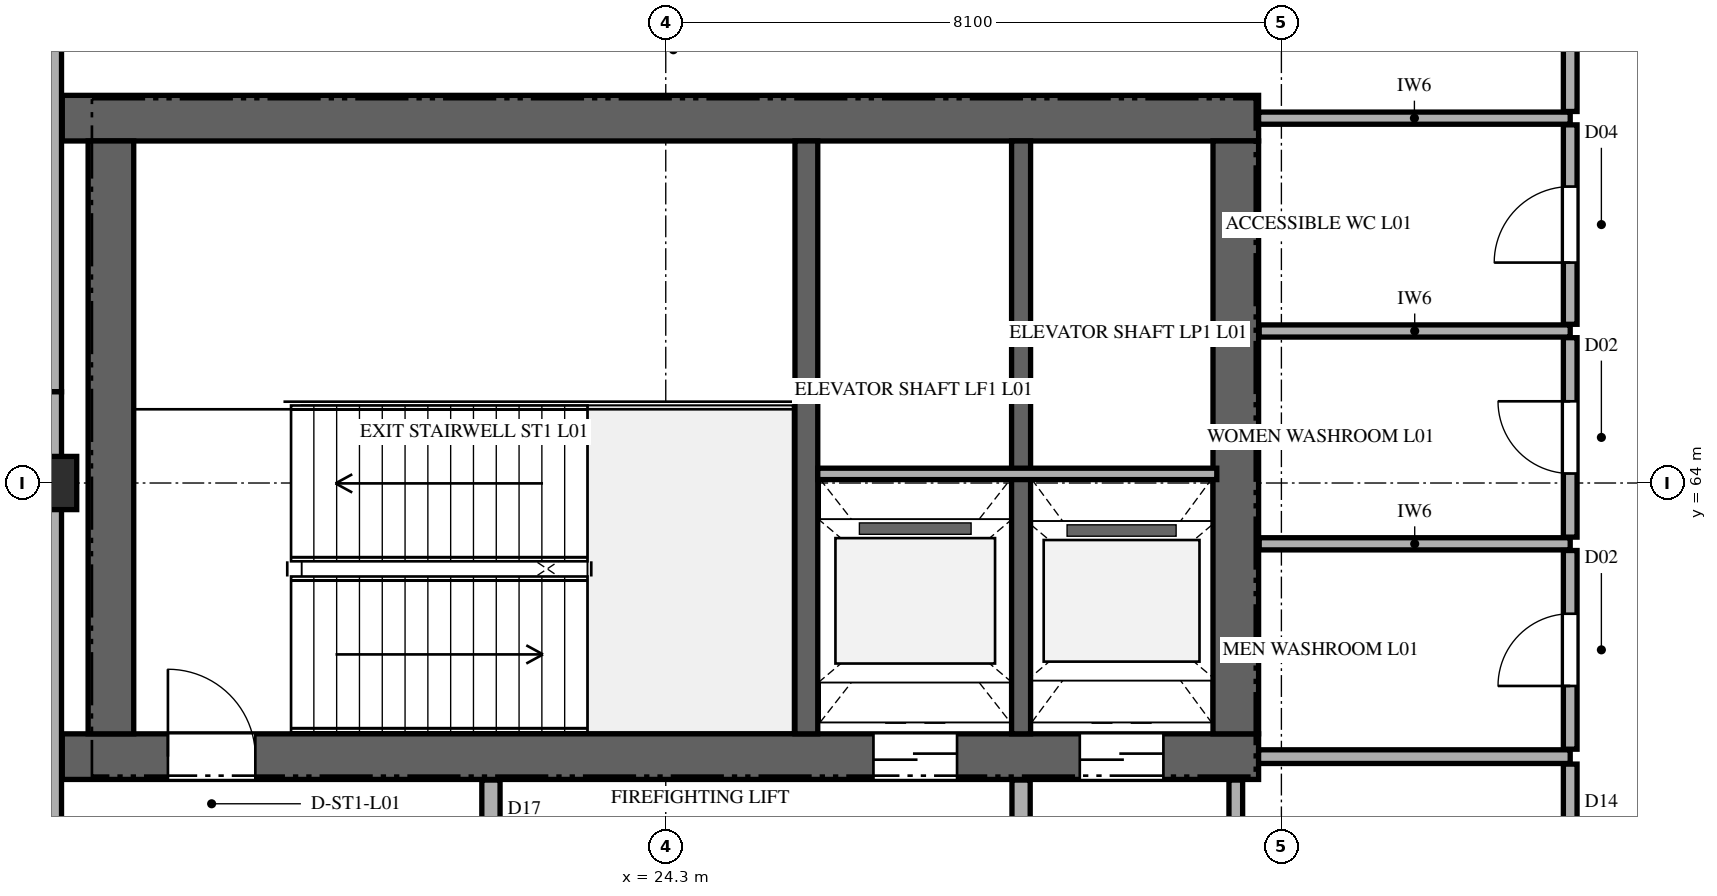
"""IFC4 building model, lengths in metres.
Left out: names, types, materials, properties, quantities, classifications, styles, units other than length and angle.
Written with IfcOpenShell. Run it as: python <this file> out.ifc"""

import sys

from ifc_helpers import new_model, si_unit, direction, frame, frame_2d, origin, origin_2d, place, context, subcontext, project, spatial, rectangle, extrude, element, fill, save


model = new_model("IFC4")
c1 = context("Model", 3, precision=1e-05, world=origin(), true_north=direction((0.0, 1.0)))
c2 = subcontext(c1, "Body", "Model", "MODEL_VIEW")
j1 = project(units=[si_unit("LENGTHUNIT", "METRE"), si_unit("PLANEANGLEUNIT", "RADIAN")], contexts=[c1])
p1 = place(None, origin())
s1 = spatial("IfcSite", under=j1, at=p1, CompositionType="ELEMENT")
p2 = place(p1, origin())
s2 = spatial("IfcBuilding", under=s1, at=p2, CompositionType="ELEMENT")
p3 = place(p2, frame((0.0, 0.0, 5.4)))
s3 = spatial("IfcBuildingStorey", under=s2, at=p3, CompositionType="ELEMENT", Elevation=5.4)
p4 = place(p3, frame((16.36, 60.4, 0.0), z_axis=(0.0, 0.0, 1.0), x_axis=(1.0, 0.0, 0.0)))
e1 = element("IfcWall", 1, at=p4, inside=s3, PredefinedType="SHEAR", context=c2, shape_type="SweptSolid", body=[
    extrude(rectangle(XDim=15.74, YDim=0.6, at=frame_2d((7.87, 0.0))), origin(), (0.0, 0.0, 1.0), 4.8),
])
p5 = place(p4, frame((1.39, 0.0, 0.0)))
e2 = element("IfcOpeningElement", 2, at=p5, cuts=e1, PredefinedType="OPENING", context=c2, shape_type="SweptSolid", body=[
    extrude(rectangle(XDim=1.15, YDim=2.25, at=frame_2d((0.575, 1.125))), frame((0.0, 0.31, 0.0), z_axis=(0.0, -1.0, 0.0), x_axis=(1.0, 0.0, 0.0)), (0.0, 0.0, 1.0), 0.62),
])
p6 = place(p4, frame((10.673, 0.0, 0.0)))
e3 = element("IfcOpeningElement", 3, at=p6, cuts=e1, PredefinedType="OPENING", context=c2, shape_type="SweptSolid", body=[
    extrude(rectangle(XDim=1.1, YDim=2.2, at=frame_2d((0.55, 1.1))), frame((0.0, 0.31, 0.0), z_axis=(0.0, -1.0, 0.0), x_axis=(1.0, 0.0, 0.0)), (0.0, 0.0, 1.0), 0.62),
])
p7 = place(p4, frame((13.387, 0.0, 0.0)))
e4 = element("IfcOpeningElement", 4, at=p7, cuts=e1, PredefinedType="OPENING", context=c2, shape_type="SweptSolid", body=[
    extrude(rectangle(XDim=1.1, YDim=2.2, at=frame_2d((0.55, 1.1))), frame((0.0, 0.31, 0.0), z_axis=(0.0, -1.0, 0.0), x_axis=(1.0, 0.0, 0.0)), (0.0, 0.0, 1.0), 0.62),
])
p8 = place(p3, frame((16.36, 68.8, 0.0), z_axis=(0.0, 0.0, 1.0), x_axis=(1.0, 0.0, 0.0)))
e5 = element("IfcWall", 5, at=p8, inside=s3, PredefinedType="SHEAR", context=c2, shape_type="SweptSolid", body=[
    extrude(rectangle(XDim=15.74, YDim=0.6, at=frame_2d((7.87, 0.0))), origin(), (0.0, 0.0, 1.0), 4.8),
])
for number, where, z_axis, x_axis in (
    (6, (17.0, 60.7, 0.0), (0.0, 0.0, 1.0), (0.0, 1.0, 0.0)),
    (7, (31.8, 60.7, 0.0), (0.0, 0.0, 1.0), (0.0, 1.0, 0.0)),
):
    element("IfcWall", number, at=place(p3, frame(where, z_axis=z_axis, x_axis=x_axis)), inside=s3, PredefinedType="SHEAR", context=c2, shape_type="SweptSolid", body=[
        extrude(rectangle(XDim=7.8, YDim=0.6, at=frame_2d((3.9, 0.0))), origin(), (0.0, 0.0, 1.0), 4.8),
    ])
p9 = place(p3, frame((26.15, 60.7, 0.0), z_axis=(0.0, 0.0, 1.0), x_axis=(0.0, 1.0, 0.0)))
e8 = element("IfcWall", 8, at=p9, inside=s3, PredefinedType="SHEAR", context=c2, shape_type="SweptSolid", body=[
    extrude(rectangle(XDim=7.8, YDim=0.3, at=frame_2d((3.9, 0.0))), origin(), (0.0, 0.0, 1.0), 4.8),
])
p10 = place(p3, frame((28.975, 60.7, 0.0), z_axis=(0.0, 0.0, 1.0), x_axis=(0.0, 1.0, 0.0)))
e9 = element("IfcWall", 9, at=p10, inside=s3, PredefinedType="SHEAR", context=c2, shape_type="SweptSolid", body=[
    extrude(rectangle(XDim=7.8, YDim=0.25, at=frame_2d((3.9, 0.0))), origin(), (0.0, 0.0, 1.0), 4.8),
])
p11 = place(p3, frame((16.2, 64.0, 0.0), z_axis=(0.0, 0.0, 1.0), x_axis=(1.0, 0.0, 0.0)))
e10 = element("IfcColumn", 10, at=p11, inside=s3, PredefinedType="COLUMN", context=c2, shape_type="SweptSolid", body=[
    extrude(rectangle(XDim=0.7, YDim=0.7, at=origin_2d()), origin(), (0.0, 0.0, 1.0), 4.8),
])
p12 = place(p3, frame((16.2, 80.8, 0.0), z_axis=(0.0, 0.0, 1.0), x_axis=(0.0, -1.0, 0.0)))
e11 = element("IfcWall", 11, at=p12, inside=s3, PredefinedType="SOLIDWALL", context=c2, shape_type="SweptSolid", body=[
    extrude(rectangle(XDim=15.6, YDim=0.3, at=frame_2d((7.8, 0.0))), origin(), (0.0, 0.0, 1.0), 3.912),
])
p13 = place(p12, frame((4.5, 0.0, 0.95)))
e12 = element("IfcOpeningElement", 12, at=p13, cuts=e11, PredefinedType="OPENING", context=c2, shape_type="SweptSolid", body=[
    extrude(rectangle(XDim=1.35, YDim=1.8, at=frame_2d((0.675, 0.9))), frame((0.0, 0.16, 0.0), z_axis=(0.0, -1.0, 0.0), x_axis=(1.0, 0.0, 0.0)), (0.0, 0.0, 1.0), 0.32),
])
p14 = place(p3, frame((16.2, 65.2, 0.0), z_axis=(0.0, 0.0, 1.0), x_axis=(0.0, -1.0, 0.0)))
e13 = element("IfcWall", 13, at=p14, inside=s3, PredefinedType="SOLIDWALL", context=c2, shape_type="SweptSolid", body=[
    extrude(rectangle(XDim=15.6, YDim=0.3, at=frame_2d((7.8, 0.0))), origin(), (0.0, 0.0, 1.0), 3.912),
])
p15 = place(p3, frame((26.3, 64.12, 0.0), z_axis=(0.0, 0.0, 1.0), x_axis=(1.0, 0.0, 0.0)))
e14 = element("IfcWall", 14, at=p15, inside=s3, PredefinedType="PARTITIONING", context=c2, shape_type="SweptSolid", body=[
    extrude(rectangle(XDim=5.25, YDim=0.15, at=frame_2d((2.625, 0.0))), origin(), (0.0, 0.0, 1.0), 4.52),
])
p16 = place(p3, frame((32.1, 60.4, 0.0), z_axis=(0.0, 0.0, 1.0), x_axis=(1.0, 0.0, 0.0)))
e15 = element("IfcWall", 15, at=p16, inside=s3, PredefinedType="PARTITIONING", context=c2, shape_type="SweptSolid", body=[
    extrude(rectangle(XDim=4.1, YDim=0.18, at=frame_2d((2.05, 0.0))), origin(), (0.0, 0.0, 1.0), 4.52),
])
for number, where, z_axis, x_axis in (
    (16, (32.108, 63.2, 0.0), (0.0, 0.0, 1.0), (1.0, 0.0, 0.0)),
    (17, (32.108, 66.0, 0.0), (0.0, 0.0, 1.0), (1.0, 0.0, 0.0)),
):
    element("IfcWall", number, at=place(p3, frame(where, z_axis=z_axis, x_axis=x_axis)), inside=s3, PredefinedType="PARTITIONING", context=c2, shape_type="SweptSolid", body=[
        extrude(rectangle(XDim=4.092, YDim=0.16, at=frame_2d((2.046, 0.0))), origin(), (0.0, 0.0, 1.0), 4.52),
    ])
p17 = place(p3, frame((32.1, 68.8, 0.0), z_axis=(0.0, 0.0, 1.0), x_axis=(1.0, 0.0, 0.0)))
e18 = element("IfcWall", 18, at=p17, inside=s3, PredefinedType="PARTITIONING", context=c2, shape_type="SweptSolid", body=[
    extrude(rectangle(XDim=4.1, YDim=0.16, at=frame_2d((2.05, 0.0))), origin(), (0.0, 0.0, 1.0), 4.52),
])
p18 = place(p3, frame((22.0, 56.928, 0.0), z_axis=(0.0, 0.0, 1.0), x_axis=(0.0, 1.0, 0.0)))
e19 = element("IfcWall", 19, at=p18, inside=s3, PredefinedType="PARTITIONING", context=c2, shape_type="SweptSolid", body=[
    extrude(rectangle(XDim=3.164, YDim=0.24, at=frame_2d((1.582, 0.0))), origin(), (0.0, 0.0, 1.0), 4.52),
])
p19 = place(p18, frame((1.082, 0.0, 0.0)))
e20 = element("IfcOpeningElement", 20, at=p19, cuts=e19, PredefinedType="OPENING", context=c2, shape_type="SweptSolid", body=[
    extrude(rectangle(XDim=1.0, YDim=2.2, at=frame_2d((0.5, 1.1))), frame((0.0, 0.13, 0.0), z_axis=(0.0, -1.0, 0.0), x_axis=(1.0, 0.0, 0.0)), (0.0, 0.0, 1.0), 0.26),
])
p20 = place(p3, frame((28.975, 56.928, 0.0), z_axis=(0.0, 0.0, 1.0), x_axis=(0.0, 1.0, 0.0)))
e21 = element("IfcWall", 21, at=p20, inside=s3, PredefinedType="PARTITIONING", context=c2, shape_type="SweptSolid", body=[
    extrude(rectangle(XDim=3.164, YDim=0.24, at=frame_2d((1.582, 0.0))), origin(), (0.0, 0.0, 1.0), 4.52),
])
p21 = place(p3, frame((31.8, 56.898, 0.0), z_axis=(0.0, 0.0, 1.0), x_axis=(0.0, 1.0, 0.0)))
e22 = element("IfcWall", 22, at=p21, inside=s3, PredefinedType="PARTITIONING", context=c2, shape_type="SweptSolid", body=[
    extrude(rectangle(XDim=3.194, YDim=0.18, at=frame_2d((1.597, 0.0))), origin(), (0.0, 0.0, 1.0), 4.52),
])
p22 = place(p3, frame((36.2, 56.898, 0.0), z_axis=(0.0, 0.0, 1.0), x_axis=(0.0, 1.0, 0.0)))
e23 = element("IfcWall", 23, at=p22, inside=s3, PredefinedType="PARTITIONING", context=c2, shape_type="SweptSolid", body=[
    extrude(rectangle(XDim=3.404, YDim=0.18, at=frame_2d((1.702, 0.0))), origin(), (0.0, 0.0, 1.0), 4.52),
])
p23 = place(p22, frame((1.202, 0.0, 0.0)))
e24 = element("IfcOpeningElement", 24, at=p23, cuts=e23, PredefinedType="OPENING", context=c2, shape_type="SweptSolid", body=[
    extrude(rectangle(XDim=1.0, YDim=2.15, at=frame_2d((0.5, 1.075))), frame((0.0, 0.1, 0.0), z_axis=(0.0, -1.0, 0.0), x_axis=(1.0, 0.0, 0.0)), (0.0, 0.0, 1.0), 0.2),
])
p24 = place(p3, frame((36.2, 60.498, 0.0), z_axis=(0.0, 0.0, 1.0), x_axis=(0.0, 1.0, 0.0)))
e25 = element("IfcWall", 25, at=p24, inside=s3, PredefinedType="PARTITIONING", context=c2, shape_type="SweptSolid", body=[
    extrude(rectangle(XDim=2.614, YDim=0.18, at=frame_2d((1.307, 0.0))), origin(), (0.0, 0.0, 1.0), 4.52),
])
p25 = place(p24, frame((0.832, 0.0, 0.0)))
e26 = element("IfcOpeningElement", 26, at=p25, cuts=e25, PredefinedType="OPENING", context=c2, shape_type="SweptSolid", body=[
    extrude(rectangle(XDim=0.95, YDim=2.1, at=frame_2d((0.475, 1.05))), frame((0.0, 0.1, 0.0), z_axis=(0.0, -1.0, 0.0), x_axis=(1.0, 0.0, 0.0)), (0.0, 0.0, 1.0), 0.2),
])
p26 = place(p3, frame((36.2, 63.288, 0.0), z_axis=(0.0, 0.0, 1.0), x_axis=(0.0, 1.0, 0.0)))
e27 = element("IfcWall", 27, at=p26, inside=s3, PredefinedType="PARTITIONING", context=c2, shape_type="SweptSolid", body=[
    extrude(rectangle(XDim=2.624, YDim=0.18, at=frame_2d((1.312, 0.0))), origin(), (0.0, 0.0, 1.0), 4.52),
])
p27 = place(p26, frame((0.837, 0.0, 0.0)))
e28 = element("IfcOpeningElement", 28, at=p27, cuts=e27, PredefinedType="OPENING", context=c2, shape_type="SweptSolid", body=[
    extrude(rectangle(XDim=0.95, YDim=2.1, at=frame_2d((0.475, 1.05))), frame((0.0, 0.1, 0.0), z_axis=(0.0, -1.0, 0.0), x_axis=(1.0, 0.0, 0.0)), (0.0, 0.0, 1.0), 0.2),
])
p28 = place(p3, frame((36.2, 66.088, 0.0), z_axis=(0.0, 0.0, 1.0), x_axis=(0.0, 1.0, 0.0)))
e29 = element("IfcWall", 29, at=p28, inside=s3, PredefinedType="PARTITIONING", context=c2, shape_type="SweptSolid", body=[
    extrude(rectangle(XDim=2.624, YDim=0.18, at=frame_2d((1.312, 0.0))), origin(), (0.0, 0.0, 1.0), 4.52),
])
p29 = place(p28, frame((0.812, 0.0, 0.0)))
e30 = element("IfcOpeningElement", 30, at=p29, cuts=e29, PredefinedType="OPENING", context=c2, shape_type="SweptSolid", body=[
    extrude(rectangle(XDim=1.0, YDim=2.15, at=frame_2d((0.5, 1.075))), frame((0.0, 0.1, 0.0), z_axis=(0.0, -1.0, 0.0), x_axis=(1.0, 0.0, 0.0)), (0.0, 0.0, 1.0), 0.2),
])
p30 = place(p3, frame((36.2, 68.888, 0.0), z_axis=(0.0, 0.0, 1.0), x_axis=(0.0, 1.0, 0.0)))
e31 = element("IfcWall", 31, at=p30, inside=s3, PredefinedType="PARTITIONING", context=c2, shape_type="SweptSolid", body=[
    extrude(rectangle(XDim=14.024, YDim=0.18, at=frame_2d((7.012, 0.0))), origin(), (0.0, 0.0, 1.0), 4.165),
])
p31 = place(p30, frame((6.512, 0.0, 0.0)))
e32 = element("IfcOpeningElement", 32, at=p31, cuts=e31, PredefinedType="OPENING", context=c2, shape_type="SweptSolid", body=[
    extrude(rectangle(XDim=1.0, YDim=2.2, at=frame_2d((0.5, 1.1))), frame((0.0, 0.1, 0.0), z_axis=(0.0, -1.0, 0.0), x_axis=(1.0, 0.0, 0.0)), (0.0, 0.0, 1.0), 0.2),
])
p32 = place(p5, origin())
e33 = element("IfcDoor", 33, at=p32, inside=s3, OperationType="SINGLE_SWING_LEFT", PredefinedType="DOOR", context=c2, shape_type="SweptSolid", body=[
    extrude(rectangle(XDim=1.15, YDim=2.25, at=frame_2d((0.575, 1.125))), frame((0.0, 0.025, 0.0), z_axis=(0.0, -1.0, 0.0), x_axis=(1.0, 0.0, 0.0)), (0.0, 0.0, 1.0), 0.05),
])
fill(e2, e33)
p33 = place(p6, frame((1.1, 0.0, 0.0), z_axis=(0.0, 0.0, 1.0), x_axis=(-1.0, 0.0, 0.0)))
e34 = element("IfcDoor", 34, at=p33, inside=s3, OperationType="DOUBLE_DOOR_SLIDING", PredefinedType="DOOR", context=c2, shape_type="SweptSolid", body=[
    extrude(rectangle(XDim=1.1, YDim=2.2, at=frame_2d((0.55, 1.1))), frame((0.0, 0.025, 0.0), z_axis=(0.0, -1.0, 0.0), x_axis=(1.0, 0.0, 0.0)), (0.0, 0.0, 1.0), 0.05),
])
fill(e3, e34)
p34 = place(p7, frame((1.1, 0.0, 0.0), z_axis=(0.0, 0.0, 1.0), x_axis=(-1.0, 0.0, 0.0)))
e35 = element("IfcDoor", 35, at=p34, inside=s3, OperationType="DOUBLE_DOOR_SLIDING", PredefinedType="DOOR", context=c2, shape_type="SweptSolid", body=[
    extrude(rectangle(XDim=1.1, YDim=2.2, at=frame_2d((0.55, 1.1))), frame((0.0, 0.025, 0.0), z_axis=(0.0, -1.0, 0.0), x_axis=(1.0, 0.0, 0.0)), (0.0, 0.0, 1.0), 0.05),
])
fill(e4, e35)
p35 = place(p25, origin())
e36 = element("IfcDoor", 36, at=p35, inside=s3, OperationType="SINGLE_SWING_LEFT", PredefinedType="DOOR", context=c2, shape_type="SweptSolid", body=[
    extrude(rectangle(XDim=0.95, YDim=2.1, at=frame_2d((0.475, 1.05))), frame((0.0, 0.025, 0.0), z_axis=(0.0, -1.0, 0.0), x_axis=(1.0, 0.0, 0.0)), (0.0, 0.0, 1.0), 0.05),
])
fill(e26, e36)
p36 = place(p27, origin())
e37 = element("IfcDoor", 37, at=p36, inside=s3, OperationType="SINGLE_SWING_RIGHT", PredefinedType="DOOR", context=c2, shape_type="SweptSolid", body=[
    extrude(rectangle(XDim=0.95, YDim=2.1, at=frame_2d((0.475, 1.05))), frame((0.0, 0.025, 0.0), z_axis=(0.0, -1.0, 0.0), x_axis=(1.0, 0.0, 0.0)), (0.0, 0.0, 1.0), 0.05),
])
fill(e28, e37)
p37 = place(p29, origin())
e38 = element("IfcDoor", 38, at=p37, inside=s3, OperationType="SINGLE_SWING_LEFT", PredefinedType="DOOR", context=c2, shape_type="SweptSolid", body=[
    extrude(rectangle(XDim=1.0, YDim=2.15, at=frame_2d((0.5, 1.075))), frame((0.0, 0.025, 0.0), z_axis=(0.0, -1.0, 0.0), x_axis=(1.0, 0.0, 0.0)), (0.0, 0.0, 1.0), 0.05),
])
fill(e30, e38)
save(model, sys.argv[1])
